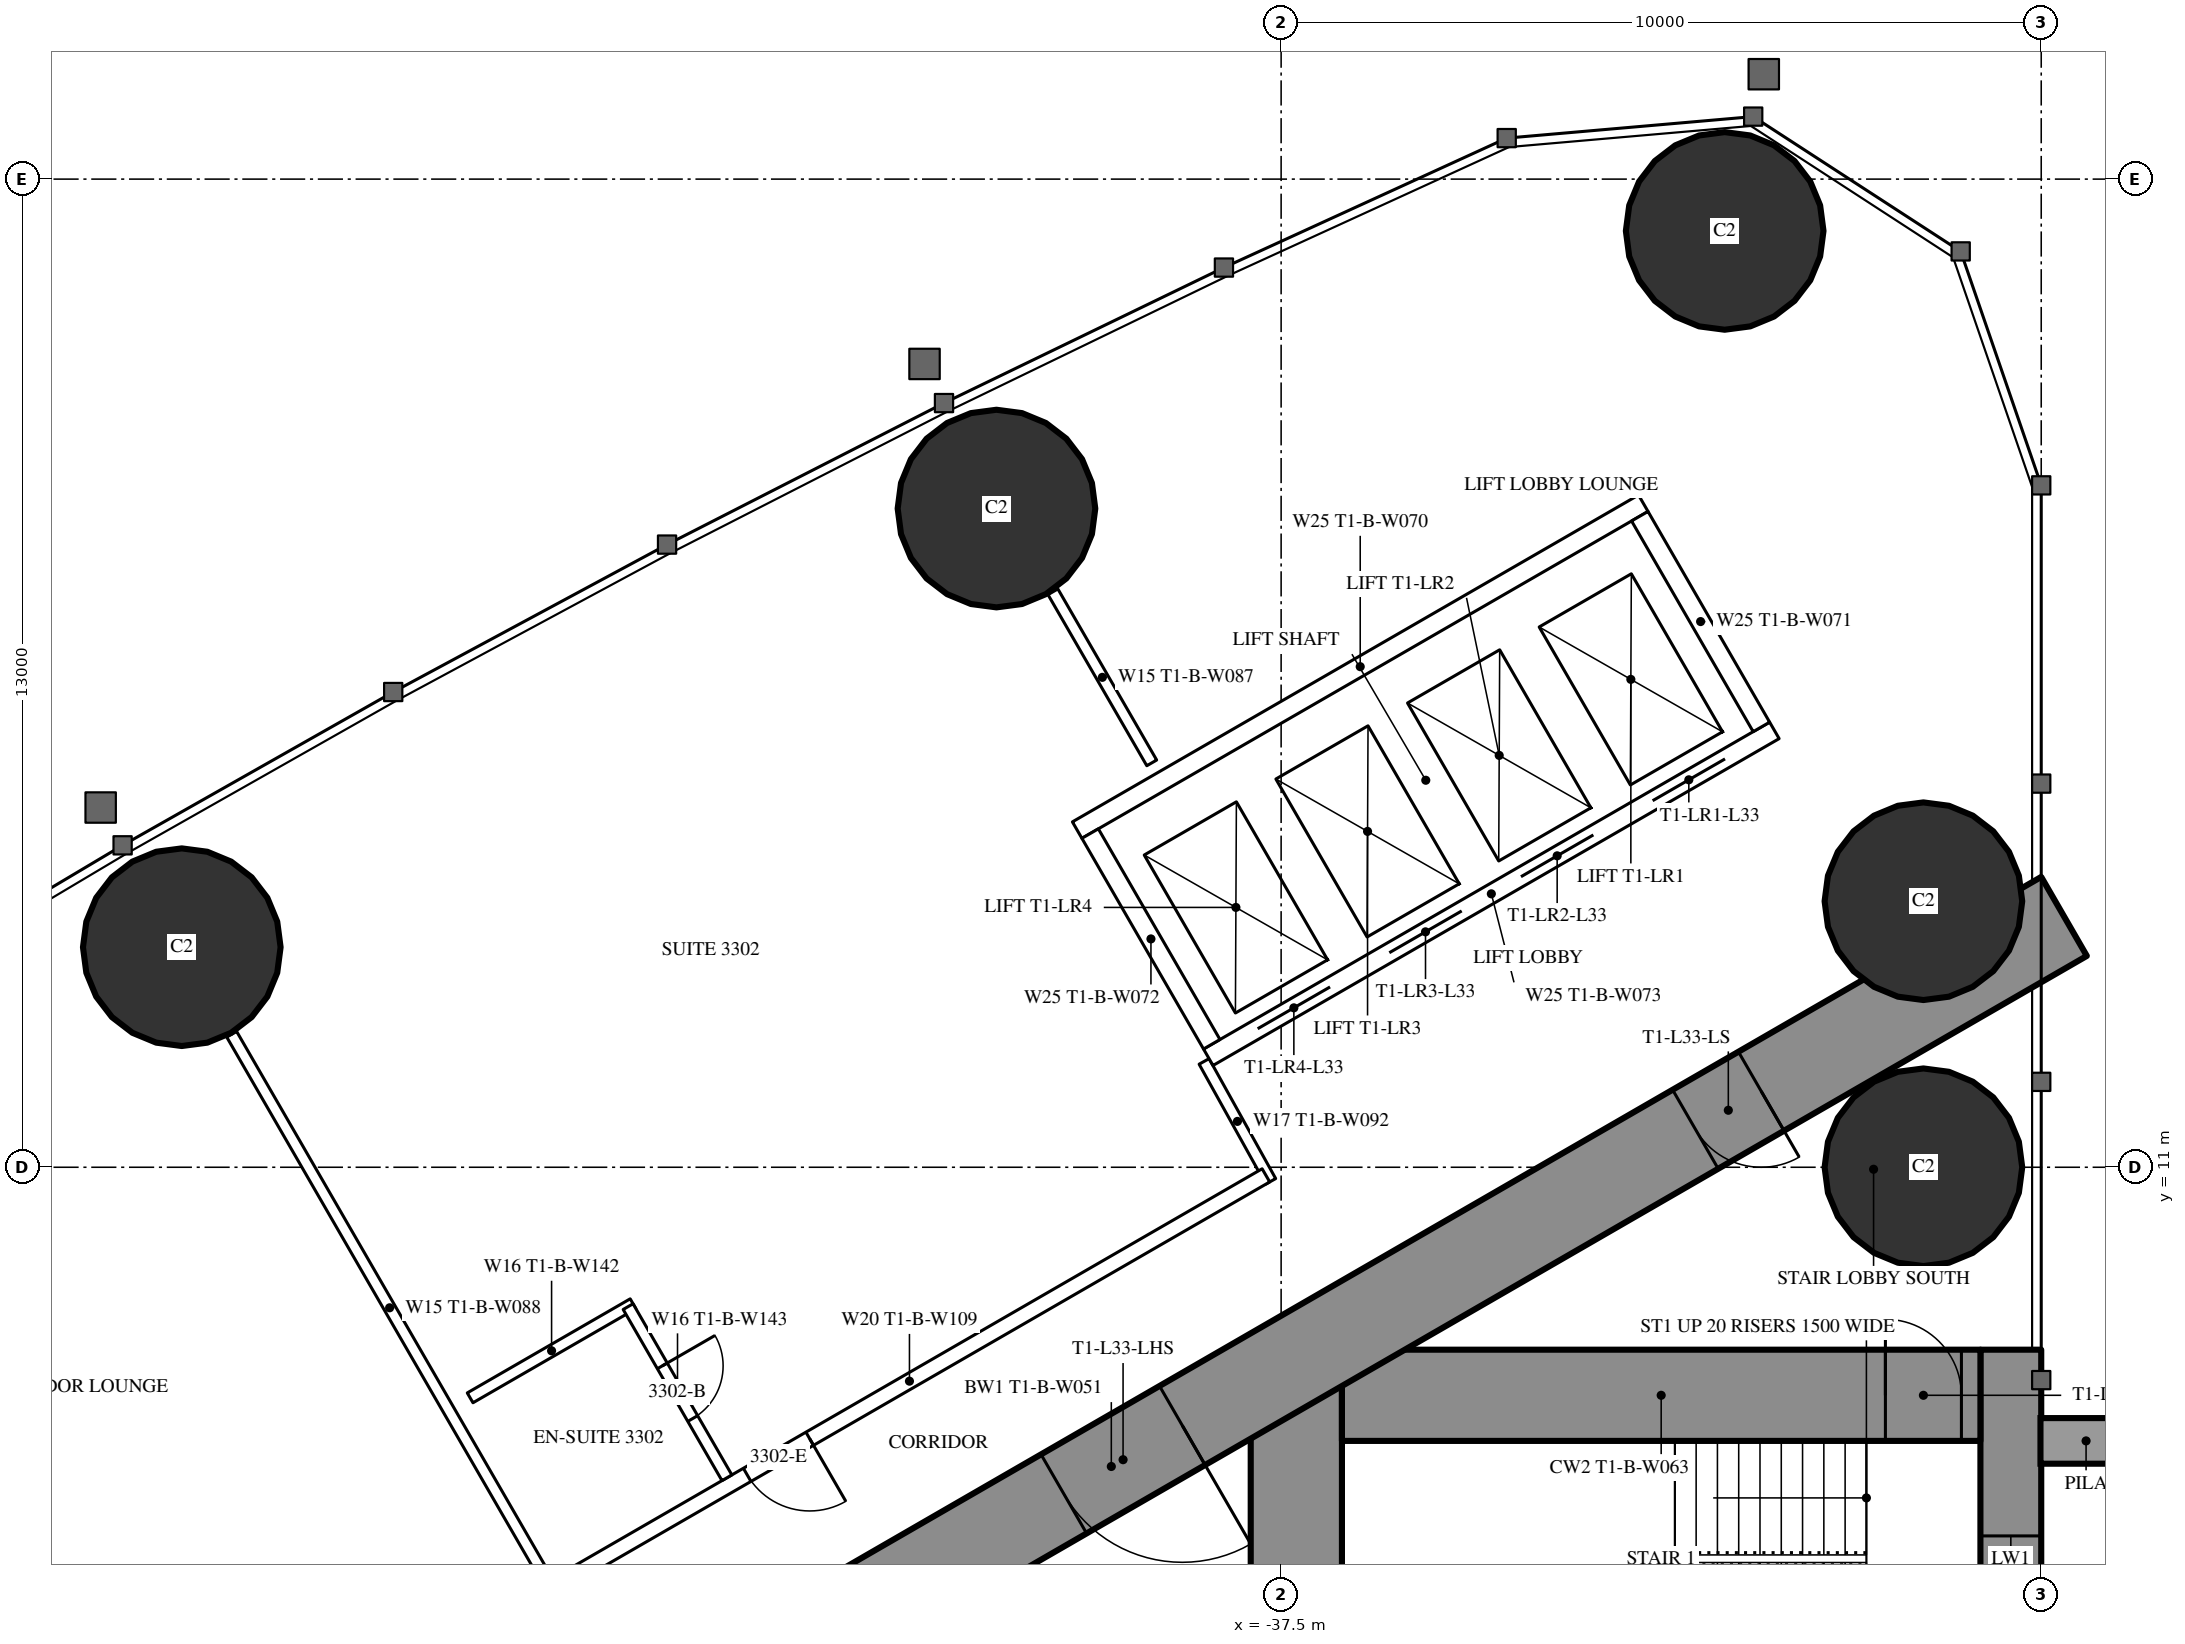
"""IFC4 building model, lengths in metres.
Left out: names, types, materials, properties, quantities, classifications, styles, units other than length and angle.
Written with IfcOpenShell. Run it as: python <this file> out.ifc"""

import sys

from ifc_helpers import new_model, si_unit, direction, frame, frame_2d, origin, origin_2d, place, context, subcontext, project, spatial, rectangle, hollow_circle, extrude, element, fill, save


model = new_model("IFC4")
c1 = context("Model", 3, precision=1e-05, world=origin(), true_north=direction((0.0, 1.0)))
c2 = subcontext(c1, "Body", "Model", "MODEL_VIEW")
j1 = project(units=[si_unit("LENGTHUNIT", "METRE"), si_unit("PLANEANGLEUNIT", "RADIAN")], contexts=[c1])
p1 = place(None, origin())
s1 = spatial("IfcSite", under=j1, at=p1, CompositionType="ELEMENT")
p2 = place(p1, origin())
s2 = spatial("IfcBuilding", under=s1, at=p2, CompositionType="ELEMENT")
p3 = place(p2, frame((0.0, 0.0, 125.6)))
s3 = spatial("IfcBuildingStorey", under=s2, at=p3, CompositionType="ELEMENT", Elevation=125.6)
for number, where, z_axis, x_axis in (
    (1, (-31.665, 23.318, 0.0), (0.0, 0.0, 1.0), (1.0, 0.0, 0.0)),
    (2, (-29.05, 11.0, 0.0), (0.0, 0.0, 1.0), (1.0, 0.0, 0.0)),
    (3, (-29.05, 14.5, 0.0), (0.0, 0.0, 1.0), (1.0, 0.0, 0.0)),
    (4, (-41.245, 19.666, 0.0), (0.0, 0.0, 1.0), (1.0, 0.0, 0.0)),
    (5, (-51.963, 13.895, 0.0), (0.0, 0.0, 1.0), (1.0, 0.0, 0.0)),
):
    element("IfcColumn", number, at=place(p3, frame(where, z_axis=z_axis, x_axis=x_axis)), inside=s3, PredefinedType="COLUMN", context=c2, shape_type="SweptSolid", body=[
        extrude(hollow_circle(Radius=1.3, WallThickness=0.1, at=origin_2d()), origin(), (0.0, 0.0, 1.0), 3.5),
    ])
p4 = place(p3, frame((-27.9, 8.6, 0.0), z_axis=(0.0, 0.0, 1.0), x_axis=(0.0, -1.0, 0.0)))
e6 = element("IfcWall", 6, at=p4, inside=s3, PredefinedType="SHEAR", context=c2, shape_type="SweptSolid", body=[
    extrude(rectangle(XDim=17.2, YDim=0.8, at=frame_2d((8.6, 0.0))), origin(), (0.0, 0.0, 1.0), 3.5),
])
p5 = place(p4, frame((2.45, 0.0, 0.6)))
e7 = element("IfcOpeningElement", 7, at=p5, cuts=e6, PredefinedType="OPENING", context=c2, shape_type="SweptSolid", body=[
    extrude(rectangle(XDim=0.6, YDim=2.1, at=frame_2d((0.3, 1.05))), frame((0.0, 0.41, 0.0), z_axis=(0.0, -1.0, 0.0), x_axis=(1.0, 0.0, 0.0)), (0.0, 0.0, 1.0), 0.82),
])
p6 = place(p4, frame((14.15, 0.0, 0.6)))
e8 = element("IfcOpeningElement", 8, at=p6, cuts=e6, PredefinedType="OPENING", context=c2, shape_type="SweptSolid", body=[
    extrude(rectangle(XDim=0.6, YDim=2.1, at=frame_2d((0.3, 1.05))), frame((0.0, 0.41, 0.0), z_axis=(0.0, -1.0, 0.0), x_axis=(1.0, 0.0, 0.0)), (0.0, 0.0, 1.0), 0.82),
])
p7 = place(p3, frame((-37.3, 8.6, 0.0), z_axis=(0.0, 0.0, 1.0), x_axis=(0.0, -1.0, 0.0)))
e9 = element("IfcWall", 9, at=p7, inside=s3, PredefinedType="SHEAR", context=c2, shape_type="SweptSolid", body=[
    extrude(rectangle(XDim=17.2, YDim=1.2, at=frame_2d((8.6, 0.0))), origin(), (0.0, 0.0, 1.0), 3.5),
])
p8 = place(p7, frame((7.7, 0.0, 0.0)))
e10 = element("IfcOpeningElement", 10, at=p8, cuts=e9, PredefinedType="OPENING", context=c2, shape_type="SweptSolid", body=[
    extrude(rectangle(XDim=1.8, YDim=2.2, at=frame_2d((0.9, 1.1))), frame((0.0, 0.61, 0.0), z_axis=(0.0, -1.0, 0.0), x_axis=(1.0, 0.0, 0.0)), (0.0, 0.0, 1.0), 1.22),
])
p9 = place(p3, frame((-28.3, 8.0, 0.0), z_axis=(0.0, 0.0, 1.0), x_axis=(-1.0, 0.0, 0.0)))
e11 = element("IfcWall", 11, at=p9, inside=s3, PredefinedType="SHEAR", context=c2, shape_type="SweptSolid", body=[
    extrude(rectangle(XDim=8.4, YDim=1.2, at=frame_2d((4.2, 0.0))), origin(), (0.0, 0.0, 1.0), 3.5),
])
p10 = place(p9, frame((0.25, 0.0, 0.0)))
e12 = element("IfcOpeningElement", 12, at=p10, cuts=e11, PredefinedType="OPENING", context=c2, shape_type="SweptSolid", body=[
    extrude(rectangle(XDim=1.0, YDim=2.2, at=frame_2d((0.5, 1.1))), frame((0.0, 0.61, 0.0), z_axis=(0.0, -1.0, 0.0), x_axis=(1.0, 0.0, 0.0)), (0.0, 0.0, 1.0), 1.22),
])
p11 = place(p3, frame((-27.2, 14.3, 0.0), z_axis=(0.0, 0.0, 1.0), x_axis=(-0.866026593062, -0.499997940104, 0.0)))
e13 = element("IfcWall", 13, at=p11, inside=s3, PredefinedType="SHEAR", context=c2, shape_type="SweptSolid", body=[
    extrude(rectangle(XDim=28.946, YDim=1.2, at=frame_2d((14.473, 0.0))), origin(), (0.0, 0.0, 1.0), 3.5),
])
p12 = place(p11, frame((4.6, 0.0, 0.0)))
e14 = element("IfcOpeningElement", 14, at=p12, cuts=e13, PredefinedType="OPENING", context=c2, shape_type="SweptSolid", body=[
    extrude(rectangle(XDim=1.0, YDim=2.2, at=frame_2d((0.5, 1.1))), frame((0.0, 0.61, 0.0), z_axis=(0.0, -1.0, 0.0), x_axis=(1.0, 0.0, 0.0)), (0.0, 0.0, 1.0), 1.22),
])
p13 = place(p11, frame((13.395, 0.0, 0.0)))
e15 = element("IfcOpeningElement", 15, at=p13, cuts=e13, PredefinedType="OPENING", context=c2, shape_type="SweptSolid", body=[
    extrude(rectangle(XDim=1.8, YDim=2.2, at=frame_2d((0.9, 1.1))), frame((0.0, 0.61, 0.0), z_axis=(0.0, -1.0, 0.0), x_axis=(1.0, 0.0, 0.0)), (0.0, 0.0, 1.0), 1.22),
])
p14 = place(p3, frame((-47.151, 5.552, 0.0), z_axis=(0.0, 0.0, 1.0), x_axis=(-0.500003012045, 0.866023664773, 0.0)))
e16 = element("IfcWall", 16, at=p14, inside=s3, PredefinedType="PARTITIONING", context=c2, shape_type="SweptSolid", body=[
    extrude(rectangle(XDim=8.311, YDim=0.15, at=frame_2d((4.156, 0.0))), origin(), (0.0, 0.0, 1.0), 2.2),
])
p15 = place(p3, frame((-39.202, 16.32, 0.0), z_axis=(0.0, 0.0, 1.0), x_axis=(-0.499947391036, 0.866055775454, 0.0)))
e17 = element("IfcWall", 17, at=p15, inside=s3, PredefinedType="PARTITIONING", context=c2, shape_type="SweptSolid", body=[
    extrude(rectangle(XDim=2.599, YDim=0.15, at=frame_2d((1.3, 0.0))), origin(), (0.0, 0.0, 1.0), 3.25),
])
p16 = place(p3, frame((-38.513, 12.392, 0.0), z_axis=(0.0, 0.0, 1.0), x_axis=(0.485585508183, -0.874189175317, 0.0)))
e18 = element("IfcWall", 18, at=p16, inside=s3, PredefinedType="PARTITIONING", context=c2, shape_type="SweptSolid", body=[
    extrude(rectangle(XDim=1.805, YDim=0.15, at=frame_2d((0.902, 0.0))), origin(), (0.0, 0.0, 1.0), 3.25),
])
p17 = place(p3, frame((-37.7, 10.894, 0.0), z_axis=(0.0, 0.0, 1.0), x_axis=(-0.866027551079, -0.499996280759, 0.0)))
e19 = element("IfcWall", 19, at=p17, inside=s3, PredefinedType="PARTITIONING", context=c2, shape_type="SweptSolid", body=[
    extrude(rectangle(XDim=10.831, YDim=0.2, at=frame_2d((5.415, 0.0))), origin(), (0.0, 0.0, 1.0), 3.25),
])
p18 = place(p17, frame((6.93, 0.0, 0.0)))
e20 = element("IfcOpeningElement", 20, at=p18, cuts=e19, PredefinedType="OPENING", context=c2, shape_type="SweptSolid", body=[
    extrude(rectangle(XDim=0.95, YDim=2.2, at=frame_2d((0.475, 1.1))), frame((0.0, 0.11, 0.0), z_axis=(0.0, -1.0, 0.0), x_axis=(1.0, 0.0, 0.0)), (0.0, 0.0, 1.0), 0.22),
])
p19 = place(p3, frame((-46.026, 9.204, 0.0), z_axis=(0.0, 0.0, 1.0), x_axis=(-0.866006523861, -0.500032699561, 0.0)))
e21 = element("IfcWall", 21, at=p19, inside=s3, PredefinedType="PARTITIONING", context=c2, shape_type="SweptSolid", body=[
    extrude(rectangle(XDim=2.475, YDim=0.15, at=frame_2d((1.237, 0.0))), origin(), (0.0, 0.0, 1.0), 3.25),
])
p20 = place(p3, frame((-44.791, 6.915, 0.0), z_axis=(0.0, 0.0, 1.0), x_axis=(-0.500047596559, 0.865997922154, 0.0)))
e22 = element("IfcWall", 22, at=p20, inside=s3, PredefinedType="PARTITIONING", context=c2, shape_type="SweptSolid", body=[
    extrude(rectangle(XDim=2.6, YDim=0.15, at=frame_2d((1.3, 0.0))), origin(), (0.0, 0.0, 1.0), 3.25),
])
p21 = place(p20, frame((0.9, 0.0, 0.0)))
e23 = element("IfcOpeningElement", 23, at=p21, cuts=e22, PredefinedType="OPENING", context=c2, shape_type="SweptSolid", body=[
    extrude(rectangle(XDim=0.8, YDim=2.2, at=frame_2d((0.4, 1.1))), frame((0.0, 0.085, 0.0), z_axis=(0.0, -1.0, 0.0), x_axis=(1.0, 0.0, 0.0)), (0.0, 0.0, 1.0), 0.17),
])
p22 = place(p3, frame((-31.01, 16.747, 0.0), z_axis=(0.0, 0.0, 1.0), x_axis=(-0.866028165386, -0.499995216735, 0.0)))
e24 = element("IfcWall", 24, at=p22, inside=s3, PredefinedType="PARTITIONING", context=c2, shape_type="SweptSolid", body=[
    extrude(rectangle(XDim=8.6, YDim=0.25, at=frame_2d((4.3, 0.0))), origin(), (0.0, 0.0, 1.0), 3.25),
])
p23 = place(p22, frame((0.75, 0.0, 0.0)))
e25 = element("IfcOpeningElement", 25, at=p23, cuts=e24, PredefinedType="OPENING", context=c2, shape_type="SweptSolid", body=[
    extrude(rectangle(XDim=1.1, YDim=2.2, at=frame_2d((0.55, 1.1))), frame((0.0, 0.135, 0.0), z_axis=(0.0, -1.0, 0.0), x_axis=(1.0, 0.0, 0.0)), (0.0, 0.0, 1.0), 0.27),
])
p24 = place(p22, frame((2.75, 0.0, 0.0)))
e26 = element("IfcOpeningElement", 26, at=p24, cuts=e24, PredefinedType="OPENING", context=c2, shape_type="SweptSolid", body=[
    extrude(rectangle(XDim=1.1, YDim=2.2, at=frame_2d((0.55, 1.1))), frame((0.0, 0.135, 0.0), z_axis=(0.0, -1.0, 0.0), x_axis=(1.0, 0.0, 0.0)), (0.0, 0.0, 1.0), 0.27),
])
p25 = place(p22, frame((4.75, 0.0, 0.0)))
e27 = element("IfcOpeningElement", 27, at=p25, cuts=e24, PredefinedType="OPENING", context=c2, shape_type="SweptSolid", body=[
    extrude(rectangle(XDim=1.1, YDim=2.2, at=frame_2d((0.55, 1.1))), frame((0.0, 0.135, 0.0), z_axis=(0.0, -1.0, 0.0), x_axis=(1.0, 0.0, 0.0)), (0.0, 0.0, 1.0), 0.27),
])
p26 = place(p22, frame((6.75, 0.0, 0.0)))
e28 = element("IfcOpeningElement", 28, at=p26, cuts=e24, PredefinedType="OPENING", context=c2, shape_type="SweptSolid", body=[
    extrude(rectangle(XDim=1.1, YDim=2.2, at=frame_2d((0.55, 1.1))), frame((0.0, 0.135, 0.0), z_axis=(0.0, -1.0, 0.0), x_axis=(1.0, 0.0, 0.0)), (0.0, 0.0, 1.0), 0.27),
])
p27 = place(p3, frame((-32.736, 19.736, 0.0), z_axis=(0.0, 0.0, 1.0), x_axis=(-0.866028165386, -0.499995216735, 0.0)))
e29 = element("IfcWall", 29, at=p27, inside=s3, PredefinedType="PARTITIONING", context=c2, shape_type="SweptSolid", body=[
    extrude(rectangle(XDim=8.6, YDim=0.25, at=frame_2d((4.3, 0.0))), origin(), (0.0, 0.0, 1.0), 3.25),
])
p28 = place(p3, frame((-31.181, 16.793, 0.0), z_axis=(0.0, 0.0, 1.0), x_axis=(-0.499929347863, 0.866066190972, 0.0)))
e30 = element("IfcWall", 30, at=p28, inside=s3, PredefinedType="PARTITIONING", context=c2, shape_type="SweptSolid", body=[
    extrude(rectangle(XDim=3.201, YDim=0.25, at=frame_2d((1.6, 0.0))), origin(), (0.0, 0.0, 1.0), 3.25),
])
p29 = place(p3, frame((-38.413, 12.618, 0.0), z_axis=(0.0, 0.0, 1.0), x_axis=(-0.499872130319, 0.866099216793, 0.0)))
e31 = element("IfcWall", 31, at=p29, inside=s3, PredefinedType="PARTITIONING", context=c2, shape_type="SweptSolid", body=[
    extrude(rectangle(XDim=3.2, YDim=0.25, at=frame_2d((1.6, 0.0))), origin(), (0.0, 0.0, 1.0), 3.25),
])
p30 = place(p21, origin())
e32 = element("IfcDoor", 32, at=p30, inside=s3, OperationType="SINGLE_SWING_RIGHT", PredefinedType="DOOR", context=c2, shape_type="SweptSolid", body=[
    extrude(rectangle(XDim=0.8, YDim=2.2, at=frame_2d((0.4, 1.1))), frame((0.0, 0.025, 0.0), z_axis=(0.0, -1.0, 0.0), x_axis=(1.0, 0.0, 0.0)), (0.0, 0.0, 1.0), 0.05),
])
fill(e23, e32)
p31 = place(p18, origin())
e33 = element("IfcDoor", 33, at=p31, inside=s3, OperationType="SINGLE_SWING_LEFT", PredefinedType="DOOR", context=c2, shape_type="SweptSolid", body=[
    extrude(rectangle(XDim=0.95, YDim=2.2, at=frame_2d((0.475, 1.1))), frame((0.0, 0.025, 0.0), z_axis=(0.0, -1.0, 0.0), x_axis=(1.0, 0.0, 0.0)), (0.0, 0.0, 1.0), 0.05),
])
fill(e20, e33)
p32 = place(p12, origin())
e34 = element("IfcDoor", 34, at=p32, inside=s3, OperationType="SINGLE_SWING_LEFT", PredefinedType="DOOR", context=c2, shape_type="SweptSolid", body=[
    extrude(rectangle(XDim=1.0, YDim=2.2, at=frame_2d((0.5, 1.1))), frame((0.0, 0.025, 0.0), z_axis=(0.0, -1.0, 0.0), x_axis=(1.0, 0.0, 0.0)), (0.0, 0.0, 1.0), 0.05),
])
fill(e14, e34)
p33 = place(p13, origin())
e35 = element("IfcDoor", 35, at=p33, inside=s3, OperationType="DOUBLE_DOOR_SINGLE_SWING", PredefinedType="DOOR", context=c2, shape_type="SweptSolid", body=[
    extrude(rectangle(XDim=1.8, YDim=2.2, at=frame_2d((0.9, 1.1))), frame((0.0, 0.025, 0.0), z_axis=(0.0, -1.0, 0.0), x_axis=(1.0, 0.0, 0.0)), (0.0, 0.0, 1.0), 0.05),
])
fill(e15, e35)
p34 = place(p10, origin())
e36 = element("IfcDoor", 36, at=p34, inside=s3, OperationType="SINGLE_SWING_RIGHT", PredefinedType="DOOR", context=c2, shape_type="SweptSolid", body=[
    extrude(rectangle(XDim=1.0, YDim=2.2, at=frame_2d((0.5, 1.1))), frame((0.0, 0.025, 0.0), z_axis=(0.0, -1.0, 0.0), x_axis=(1.0, 0.0, 0.0)), (0.0, 0.0, 1.0), 0.05),
])
fill(e12, e36)
p35 = place(p23, origin())
e37 = element("IfcDoor", 37, at=p35, inside=s3, OperationType="DOUBLE_DOOR_SLIDING", PredefinedType="USERDEFINED", context=c2, shape_type="SweptSolid", body=[
    extrude(rectangle(XDim=1.1, YDim=2.2, at=frame_2d((0.55, 1.1))), frame((0.0, 0.025, 0.0), z_axis=(0.0, -1.0, 0.0), x_axis=(1.0, 0.0, 0.0)), (0.0, 0.0, 1.0), 0.05),
])
fill(e25, e37)
p36 = place(p24, origin())
e38 = element("IfcDoor", 38, at=p36, inside=s3, OperationType="DOUBLE_DOOR_SLIDING", PredefinedType="USERDEFINED", context=c2, shape_type="SweptSolid", body=[
    extrude(rectangle(XDim=1.1, YDim=2.2, at=frame_2d((0.55, 1.1))), frame((0.0, 0.025, 0.0), z_axis=(0.0, -1.0, 0.0), x_axis=(1.0, 0.0, 0.0)), (0.0, 0.0, 1.0), 0.05),
])
fill(e26, e38)
p37 = place(p25, origin())
e39 = element("IfcDoor", 39, at=p37, inside=s3, OperationType="DOUBLE_DOOR_SLIDING", PredefinedType="USERDEFINED", context=c2, shape_type="SweptSolid", body=[
    extrude(rectangle(XDim=1.1, YDim=2.2, at=frame_2d((0.55, 1.1))), frame((0.0, 0.025, 0.0), z_axis=(0.0, -1.0, 0.0), x_axis=(1.0, 0.0, 0.0)), (0.0, 0.0, 1.0), 0.05),
])
fill(e27, e39)
p38 = place(p26, origin())
e40 = element("IfcDoor", 40, at=p38, inside=s3, OperationType="DOUBLE_DOOR_SLIDING", PredefinedType="USERDEFINED", context=c2, shape_type="SweptSolid", body=[
    extrude(rectangle(XDim=1.1, YDim=2.2, at=frame_2d((0.55, 1.1))), frame((0.0, 0.025, 0.0), z_axis=(0.0, -1.0, 0.0), x_axis=(1.0, 0.0, 0.0)), (0.0, 0.0, 1.0), 0.05),
])
fill(e28, e40)
p39 = place(p5, origin())
e41 = element("IfcWindow", 41, at=p39, inside=s3, PartitioningType="SINGLE_PANEL", PredefinedType="WINDOW", context=c2, shape_type="SweptSolid", body=[
    extrude(rectangle(XDim=0.6, YDim=2.1, at=frame_2d((0.3, 1.05))), frame((0.0, 0.03, 0.0), z_axis=(0.0, -1.0, 0.0), x_axis=(1.0, 0.0, 0.0)), (0.0, 0.0, 1.0), 0.06),
])
fill(e7, e41)
save(model, sys.argv[1])
